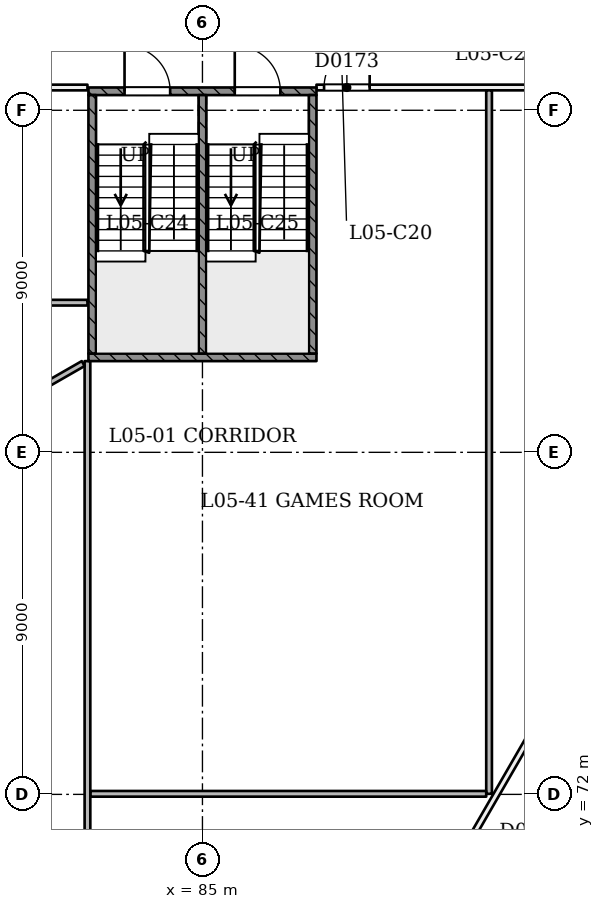
"""IFC4 building model, lengths in metres.
Left out: names, types, materials, properties, quantities, classifications, styles, units other than length and angle.
Written with IfcOpenShell. Run it as: python <this file> out.ifc"""

import sys

from ifc_helpers import new_model, si_unit, direction, frame, frame_2d, origin, place, context, subcontext, project, spatial, rectangle, extrude, element, fill, save


model = new_model("IFC4")
c1 = context("Model", 3, precision=1e-05, world=origin(), true_north=direction((0.0, 1.0)))
c2 = subcontext(c1, "Body", "Model", "MODEL_VIEW")
j1 = project(units=[si_unit("LENGTHUNIT", "METRE"), si_unit("PLANEANGLEUNIT", "RADIAN")], contexts=[c1])
p1 = place(None, origin())
s1 = spatial("IfcSite", under=j1, at=p1, CompositionType="ELEMENT")
p2 = place(p1, origin())
s2 = spatial("IfcBuilding", under=s1, at=p2, CompositionType="ELEMENT")
p3 = place(p2, frame((0.0, 0.0, 27.0)))
s3 = spatial("IfcBuildingStorey", under=s2, at=p3, CompositionType="ELEMENT", Elevation=27.0)
p4 = place(p3, frame((61.193, 96.236, 0.0), z_axis=(0.0, 0.0, 1.0), x_axis=(0.49999953585, -0.866025671762, 0.0)))
e1 = element("IfcWall", 1, at=p4, inside=s3, PredefinedType="PARTITIONING", context=c2, shape_type="SweptSolid", body=[
    extrude(rectangle(XDim=45.0, YDim=0.15, at=frame_2d((22.5, 0.0))), origin(), (0.0, 0.0, 1.0), 2.7),
])
p5 = place(p4, frame((1.75, 0.0, 0.0)))
e2 = element("IfcOpeningElement", 2, at=p5, cuts=e1, PredefinedType="OPENING", context=c2, shape_type="SweptSolid", body=[
    extrude(rectangle(XDim=1.0, YDim=2.1, at=frame_2d((0.5, 1.05))), frame((0.0, 0.085, 0.0), z_axis=(0.0, -1.0, 0.0), x_axis=(1.0, 0.0, 0.0)), (0.0, 0.0, 1.0), 0.171),
])
p6 = place(p4, frame((7.3, 0.0, 0.0)))
e3 = element("IfcOpeningElement", 3, at=p6, cuts=e1, PredefinedType="OPENING", context=c2, shape_type="SweptSolid", body=[
    extrude(rectangle(XDim=1.2, YDim=2.1, at=frame_2d((0.6, 1.05))), frame((0.0, 0.085, 0.0), z_axis=(0.0, -1.0, 0.0), x_axis=(1.0, 0.0, 0.0)), (0.0, 0.0, 1.0), 0.171),
])
p7 = place(p4, frame((14.071, 0.0, 0.0)))
e4 = element("IfcOpeningElement", 4, at=p7, cuts=e1, PredefinedType="OPENING", context=c2, shape_type="SweptSolid", body=[
    extrude(rectangle(XDim=1.1, YDim=2.1, at=frame_2d((0.55, 1.05))), frame((0.0, 0.085, 0.0), z_axis=(0.0, -1.0, 0.0), x_axis=(1.0, 0.0, 0.0)), (0.0, 0.0, 1.0), 0.171),
])
p8 = place(p4, frame((20.78, 0.0, 0.0)))
e5 = element("IfcOpeningElement", 5, at=p8, cuts=e1, PredefinedType="OPENING", context=c2, shape_type="SweptSolid", body=[
    extrude(rectangle(XDim=1.0, YDim=2.1, at=frame_2d((0.5, 1.05))), frame((0.0, 0.085, 0.0), z_axis=(0.0, -1.0, 0.0), x_axis=(1.0, 0.0, 0.0)), (0.0, 0.0, 1.0), 0.171),
])
p9 = place(p4, frame((23.105, 0.0, 0.0)))
e6 = element("IfcOpeningElement", 6, at=p9, cuts=e1, PredefinedType="OPENING", context=c2, shape_type="SweptSolid", body=[
    extrude(rectangle(XDim=1.0, YDim=2.1, at=frame_2d((0.5, 1.05))), frame((0.0, 0.085, 0.0), z_axis=(0.0, -1.0, 0.0), x_axis=(1.0, 0.0, 0.0)), (0.0, 0.0, 1.0), 0.171),
])
p10 = place(p4, frame((28.75, 0.0, 0.0)))
e7 = element("IfcOpeningElement", 7, at=p10, cuts=e1, PredefinedType="OPENING", context=c2, shape_type="SweptSolid", body=[
    extrude(rectangle(XDim=1.0, YDim=2.1, at=frame_2d((0.5, 1.05))), frame((0.0, 0.085, 0.0), z_axis=(0.0, -1.0, 0.0), x_axis=(1.0, 0.0, 0.0)), (0.0, 0.0, 1.0), 0.171),
])
p11 = place(p4, frame((34.3, 0.0, 0.0)))
e8 = element("IfcOpeningElement", 8, at=p11, cuts=e1, PredefinedType="OPENING", context=c2, shape_type="SweptSolid", body=[
    extrude(rectangle(XDim=1.2, YDim=2.1, at=frame_2d((0.6, 1.05))), frame((0.0, 0.085, 0.0), z_axis=(0.0, -1.0, 0.0), x_axis=(1.0, 0.0, 0.0)), (0.0, 0.0, 1.0), 0.171),
])
p12 = place(p4, frame((43.28, 0.0, 0.0)))
e9 = element("IfcOpeningElement", 9, at=p12, cuts=e1, PredefinedType="OPENING", context=c2, shape_type="SweptSolid", body=[
    extrude(rectangle(XDim=1.0, YDim=2.1, at=frame_2d((0.5, 1.05))), frame((0.0, 0.085, 0.0), z_axis=(0.0, -1.0, 0.0), x_axis=(1.0, 0.0, 0.0)), (0.0, 0.0, 1.0), 0.171),
])
p13 = place(p3, frame((86.307, 57.264, 0.0), z_axis=(0.0, 0.0, 1.0), x_axis=(0.500000579958, 0.866025068945, 0.0)))
e10 = element("IfcWall", 10, at=p13, inside=s3, PredefinedType="PARTITIONING", context=c2, shape_type="SweptSolid", body=[
    extrude(rectangle(XDim=40.5, YDim=0.15, at=frame_2d((20.25, 0.0))), origin(), (0.0, 0.0, 1.0), 2.7),
])
p14 = place(p13, frame((0.72, 0.0, 0.0)))
e11 = element("IfcOpeningElement", 11, at=p14, cuts=e10, PredefinedType="OPENING", context=c2, shape_type="SweptSolid", body=[
    extrude(rectangle(XDim=1.0, YDim=2.1, at=frame_2d((0.5, 1.05))), frame((0.0, 0.085, 0.0), z_axis=(0.0, -1.0, 0.0), x_axis=(1.0, 0.0, 0.0)), (0.0, 0.0, 1.0), 0.171),
])
p15 = place(p13, frame((5.22, 0.0, 0.0)))
e12 = element("IfcOpeningElement", 12, at=p15, cuts=e10, PredefinedType="OPENING", context=c2, shape_type="SweptSolid", body=[
    extrude(rectangle(XDim=1.0, YDim=2.1, at=frame_2d((0.5, 1.05))), frame((0.0, 0.085, 0.0), z_axis=(0.0, -1.0, 0.0), x_axis=(1.0, 0.0, 0.0)), (0.0, 0.0, 1.0), 0.171),
])
p16 = place(p13, frame((11.78, 0.0, 0.0)))
e13 = element("IfcOpeningElement", 13, at=p16, cuts=e10, PredefinedType="OPENING", context=c2, shape_type="SweptSolid", body=[
    extrude(rectangle(XDim=1.0, YDim=2.1, at=frame_2d((0.5, 1.05))), frame((0.0, 0.085, 0.0), z_axis=(0.0, -1.0, 0.0), x_axis=(1.0, 0.0, 0.0)), (0.0, 0.0, 1.0), 0.171),
])
p17 = place(p13, frame((14.22, 0.0, 0.0)))
e14 = element("IfcOpeningElement", 14, at=p17, cuts=e10, PredefinedType="OPENING", context=c2, shape_type="SweptSolid", body=[
    extrude(rectangle(XDim=1.0, YDim=2.1, at=frame_2d((0.5, 1.05))), frame((0.0, 0.085, 0.0), z_axis=(0.0, -1.0, 0.0), x_axis=(1.0, 0.0, 0.0)), (0.0, 0.0, 1.0), 0.171),
])
p18 = place(p13, frame((19.75, 0.0, 0.0)))
e15 = element("IfcOpeningElement", 15, at=p18, cuts=e10, PredefinedType="OPENING", context=c2, shape_type="SweptSolid", body=[
    extrude(rectangle(XDim=1.0, YDim=2.1, at=frame_2d((0.5, 1.05))), frame((0.0, 0.085, 0.0), z_axis=(0.0, -1.0, 0.0), x_axis=(1.0, 0.0, 0.0)), (0.0, 0.0, 1.0), 0.171),
])
p19 = place(p13, frame((23.22, 0.0, 0.0)))
e16 = element("IfcOpeningElement", 16, at=p19, cuts=e10, PredefinedType="OPENING", context=c2, shape_type="SweptSolid", body=[
    extrude(rectangle(XDim=1.0, YDim=2.1, at=frame_2d((0.5, 1.05))), frame((0.0, 0.085, 0.0), z_axis=(0.0, -1.0, 0.0), x_axis=(1.0, 0.0, 0.0)), (0.0, 0.0, 1.0), 0.171),
])
p20 = place(p13, frame((29.895, 0.0, 0.0)))
e17 = element("IfcOpeningElement", 17, at=p20, cuts=e10, PredefinedType="OPENING", context=c2, shape_type="SweptSolid", body=[
    extrude(rectangle(XDim=1.0, YDim=2.1, at=frame_2d((0.5, 1.05))), frame((0.0, 0.085, 0.0), z_axis=(0.0, -1.0, 0.0), x_axis=(1.0, 0.0, 0.0)), (0.0, 0.0, 1.0), 0.171),
])
p21 = place(p13, frame((32.105, 0.0, 0.0)))
e18 = element("IfcOpeningElement", 18, at=p21, cuts=e10, PredefinedType="OPENING", context=c2, shape_type="SweptSolid", body=[
    extrude(rectangle(XDim=1.0, YDim=2.1, at=frame_2d((0.5, 1.05))), frame((0.0, 0.085, 0.0), z_axis=(0.0, -1.0, 0.0), x_axis=(1.0, 0.0, 0.0)), (0.0, 0.0, 1.0), 0.171),
])
p22 = place(p13, frame((38.78, 0.0, 0.0)))
e19 = element("IfcOpeningElement", 19, at=p22, cuts=e10, PredefinedType="OPENING", context=c2, shape_type="SweptSolid", body=[
    extrude(rectangle(XDim=1.0, YDim=2.1, at=frame_2d((0.5, 1.05))), frame((0.0, 0.085, 0.0), z_axis=(0.0, -1.0, 0.0), x_axis=(1.0, 0.0, 0.0)), (0.0, 0.0, 1.0), 0.171),
])
p23 = place(p3, frame((88.0, 90.599, 0.0), z_axis=(0.0, 0.0, 1.0), x_axis=(0.999999997975, 6.3639545e-05, 0.0)))
e20 = element("IfcWall", 20, at=p23, inside=s3, PredefinedType="PARTITIONING", context=c2, shape_type="SweptSolid", body=[
    extrude(rectangle(XDim=15.345, YDim=0.15, at=frame_2d((7.673, 0.0))), origin(), (0.0, 0.0, 1.0), 3.1),
])
p24 = place(p23, frame((0.2, 0.0, 0.0)))
e21 = element("IfcOpeningElement", 21, at=p24, cuts=e20, PredefinedType="OPENING", context=c2, shape_type="SweptSolid", body=[
    extrude(rectangle(XDim=1.2, YDim=2.1, at=frame_2d((0.6, 1.05))), frame((0.0, 0.085, 0.0), z_axis=(0.0, -1.0, 0.0), x_axis=(1.0, 0.0, 0.0)), (0.0, 0.0, 1.0), 0.171),
])
p25 = place(p3, frame((103.475, 90.6, 0.0), z_axis=(0.0, 0.0, 1.0), x_axis=(-0.500000687442, -0.866025006889, 0.0)))
e22 = element("IfcWall", 22, at=p25, inside=s3, PredefinedType="PARTITIONING", context=c2, shape_type="SweptSolid", body=[
    extrude(rectangle(XDim=36.535, YDim=0.15, at=frame_2d((18.267, 0.0))), origin(), (0.0, 0.0, 1.0), 3.1),
])
p26 = place(p25, frame((8.507, 0.0, 0.0)))
e23 = element("IfcOpeningElement", 23, at=p26, cuts=e22, PredefinedType="OPENING", context=c2, shape_type="SweptSolid", body=[
    extrude(rectangle(XDim=1.2, YDim=2.1, at=frame_2d((0.6, 1.05))), frame((0.0, 0.085, 0.0), z_axis=(0.0, -1.0, 0.0), x_axis=(1.0, 0.0, 0.0)), (0.0, 0.0, 1.0), 0.171),
])
p27 = place(p3, frame((84.792, 58.96, 0.0), z_axis=(0.0, 0.0, 1.0), x_axis=(-0.499995675587, 0.866027900471, 0.0)))
e24 = element("IfcWall", 24, at=p27, inside=s3, PredefinedType="PARTITIONING", context=c2, shape_type="SweptSolid", body=[
    extrude(rectangle(XDim=36.534, YDim=0.15, at=frame_2d((18.267, 0.0))), origin(), (0.0, 0.0, 1.0), 3.1),
])
p28 = place(p27, frame((4.466, 0.0, 0.0)))
e25 = element("IfcOpeningElement", 25, at=p28, cuts=e24, PredefinedType="OPENING", context=c2, shape_type="SweptSolid", body=[
    extrude(rectangle(XDim=1.2, YDim=2.1, at=frame_2d((0.6, 1.05))), frame((0.0, 0.085, 0.0), z_axis=(0.0, -1.0, 0.0), x_axis=(1.0, 0.0, 0.0)), (0.0, 0.0, 1.0), 0.171),
])
p29 = place(p27, frame((16.337, 0.0, 0.0)))
e26 = element("IfcOpeningElement", 26, at=p29, cuts=e24, PredefinedType="OPENING", context=c2, shape_type="SweptSolid", body=[
    extrude(rectangle(XDim=1.2, YDim=2.1, at=frame_2d((0.6, 1.05))), frame((0.0, 0.085, 0.0), z_axis=(0.0, -1.0, 0.0), x_axis=(1.0, 0.0, 0.0)), (0.0, 0.0, 1.0), 0.171),
])
p30 = place(p27, frame((30.124, 0.0, 0.0)))
e27 = element("IfcOpeningElement", 27, at=p30, cuts=e24, PredefinedType="OPENING", context=c2, shape_type="SweptSolid", body=[
    extrude(rectangle(XDim=1.2, YDim=2.1, at=frame_2d((0.6, 1.05))), frame((0.0, 0.085, 0.0), z_axis=(0.0, -1.0, 0.0), x_axis=(1.0, 0.0, 0.0)), (0.0, 0.0, 1.0), 0.171),
])
p31 = place(p27, frame((24.546, 0.0, 0.0)))
e28 = element("IfcOpeningElement", 28, at=p31, cuts=e24, PredefinedType="OPENING", context=c2, shape_type="SweptSolid", body=[
    extrude(rectangle(XDim=1.2, YDim=2.1, at=frame_2d((0.6, 1.05))), frame((0.0, 0.085, 0.0), z_axis=(0.0, -1.0, 0.0), x_axis=(1.0, 0.0, 0.0)), (0.0, 0.0, 1.0), 0.171),
])
p32 = place(p3, frame((66.655, 90.6, 0.0), z_axis=(0.0, 0.0, 1.0), x_axis=(0.999999997968, -6.3746036e-05, 0.0)))
e29 = element("IfcWall", 29, at=p32, inside=s3, PredefinedType="PARTITIONING", context=c2, shape_type="SweptSolid", body=[
    extrude(rectangle(XDim=15.32, YDim=0.15, at=frame_2d((7.66, 0.0))), origin(), (0.0, 0.0, 1.0), 3.1),
])
p33 = place(p3, frame((92.542, 72.015, 0.0), z_axis=(0.0, 0.0, 1.0), x_axis=(0.0, 1.0, 0.0)))
e30 = element("IfcWall", 30, at=p33, inside=s3, PredefinedType="PARTITIONING", context=c2, shape_type="SweptSolid", body=[
    extrude(rectangle(XDim=18.509, YDim=0.15, at=frame_2d((9.255, 0.0))), origin(), (0.0, 0.0, 1.0), 3.1),
])
p34 = place(p3, frame((82.049, 72.015, 0.0), z_axis=(0.0, 0.0, 1.0), x_axis=(1.0, 0.0, 0.0)))
e31 = element("IfcWall", 31, at=p34, inside=s3, PredefinedType="PARTITIONING", context=c2, shape_type="SweptSolid", body=[
    extrude(rectangle(XDim=10.417, YDim=0.15, at=frame_2d((5.208, 0.0))), origin(), (0.0, 0.0, 1.0), 3.1),
])
p35 = place(p3, frame((81.974, 83.4, 0.0), z_axis=(0.0, 0.0, 1.0), x_axis=(0.0, -1.0, 0.0)))
e32 = element("IfcWall", 32, at=p35, inside=s3, PredefinedType="PARTITIONING", context=c2, shape_type="SweptSolid", body=[
    extrude(rectangle(XDim=19.279, YDim=0.15, at=frame_2d((9.64, 0.0))), origin(), (0.0, 0.0, 1.0), 3.1),
])
p36 = place(p3, frame((81.862, 83.335, 0.0), z_axis=(0.0, 0.0, 1.0), x_axis=(-0.867344213884, -0.497708764883, 0.0)))
e33 = element("IfcWall", 33, at=p36, inside=s3, PredefinedType="PARTITIONING", context=c2, shape_type="SweptSolid", body=[
    extrude(rectangle(XDim=9.575, YDim=0.15, at=frame_2d((4.788, 0.0))), origin(), (0.0, 0.0, 1.0), 3.1),
])
p37 = place(p3, frame((69.924, 84.938, 0.0), z_axis=(0.0, 0.0, 1.0), x_axis=(1.0, 0.0, 0.0)))
e34 = element("IfcWall", 34, at=p37, inside=s3, PredefinedType="PARTITIONING", context=c2, shape_type="SweptSolid", body=[
    extrude(rectangle(XDim=12.051, YDim=0.15, at=frame_2d((6.025, 0.0))), origin(), (0.0, 0.0, 1.0), 3.1),
])
p38 = place(p3, frame((82.0, 90.5, 0.0), z_axis=(0.0, 0.0, 1.0), x_axis=(1.0, 0.0, 0.0)))
e35 = element("IfcWall", 35, at=p38, inside=s3, PredefinedType="SOLIDWALL", context=c2, shape_type="SweptSolid", body=[
    extrude(rectangle(XDim=6.0, YDim=0.2, at=frame_2d((3.0, 0.0))), origin(), (0.0, 0.0, 1.0), 3.1),
])
p39 = place(p38, frame((0.95, 0.0, 0.0)))
e36 = element("IfcOpeningElement", 36, at=p39, cuts=e35, PredefinedType="OPENING", context=c2, shape_type="SweptSolid", body=[
    extrude(rectangle(XDim=1.2, YDim=2.1, at=frame_2d((0.6, 1.05))), frame((0.0, 0.11, 0.0), z_axis=(0.0, -1.0, 0.0), x_axis=(1.0, 0.0, 0.0)), (0.0, 0.0, 1.0), 0.221),
])
p40 = place(p38, frame((3.85, 0.0, 0.0)))
e37 = element("IfcOpeningElement", 37, at=p40, cuts=e35, PredefinedType="OPENING", context=c2, shape_type="SweptSolid", body=[
    extrude(rectangle(XDim=1.2, YDim=2.1, at=frame_2d((0.6, 1.05))), frame((0.0, 0.11, 0.0), z_axis=(0.0, -1.0, 0.0), x_axis=(1.0, 0.0, 0.0)), (0.0, 0.0, 1.0), 0.221),
])
p41 = place(p3, frame((82.0, 83.5, 0.0), z_axis=(0.0, 0.0, 1.0), x_axis=(1.0, 0.0, 0.0)))
e38 = element("IfcWall", 38, at=p41, inside=s3, PredefinedType="SOLIDWALL", context=c2, shape_type="SweptSolid", body=[
    extrude(rectangle(XDim=6.0, YDim=0.2, at=frame_2d((3.0, 0.0))), origin(), (0.0, 0.0, 1.0), 3.1),
])
for number, where, z_axis, x_axis in (
    (39, (82.1, 83.6, 0.0), (0.0, 0.0, 1.0), (0.0, 1.0, 0.0)),
    (40, (87.9, 83.6, 0.0), (0.0, 0.0, 1.0), (0.0, 1.0, 0.0)),
    (41, (85.0, 83.6, 0.0), (0.0, 0.0, 1.0), (0.0, 1.0, 0.0)),
):
    element("IfcWall", number, at=place(p3, frame(where, z_axis=z_axis, x_axis=x_axis)), inside=s3, PredefinedType="SOLIDWALL", context=c2, shape_type="SweptSolid", body=[
        extrude(rectangle(XDim=6.8, YDim=0.2, at=frame_2d((3.4, 0.0))), origin(), (0.0, 0.0, 1.0), 3.1),
    ])
p42 = place(p24, origin())
e42 = element("IfcDoor", 42, at=p42, inside=s3, OperationType="SINGLE_SWING_RIGHT", PredefinedType="NOTDEFINED", context=c2, shape_type="SweptSolid", body=[
    extrude(rectangle(XDim=1.2, YDim=2.1, at=frame_2d((0.6, 1.05))), frame((0.0, 0.025, 0.0), z_axis=(0.0, -1.0, 0.0), x_axis=(1.0, 0.0, 0.0)), (0.0, 0.0, 1.0), 0.05),
])
fill(e21, e42)
p43 = place(p39, origin())
e43 = element("IfcDoor", 43, at=p43, inside=s3, OperationType="SINGLE_SWING_LEFT", PredefinedType="NOTDEFINED", context=c2, shape_type="SweptSolid", body=[
    extrude(rectangle(XDim=1.2, YDim=2.1, at=frame_2d((0.6, 1.05))), frame((0.0, 0.025, 0.0), z_axis=(0.0, -1.0, 0.0), x_axis=(1.0, 0.0, 0.0)), (0.0, 0.0, 1.0), 0.05),
])
fill(e36, e43)
p44 = place(p40, origin())
e44 = element("IfcDoor", 44, at=p44, inside=s3, OperationType="SINGLE_SWING_LEFT", PredefinedType="NOTDEFINED", context=c2, shape_type="SweptSolid", body=[
    extrude(rectangle(XDim=1.2, YDim=2.1, at=frame_2d((0.6, 1.05))), frame((0.0, 0.025, 0.0), z_axis=(0.0, -1.0, 0.0), x_axis=(1.0, 0.0, 0.0)), (0.0, 0.0, 1.0), 0.05),
])
fill(e37, e44)
save(model, sys.argv[1])
